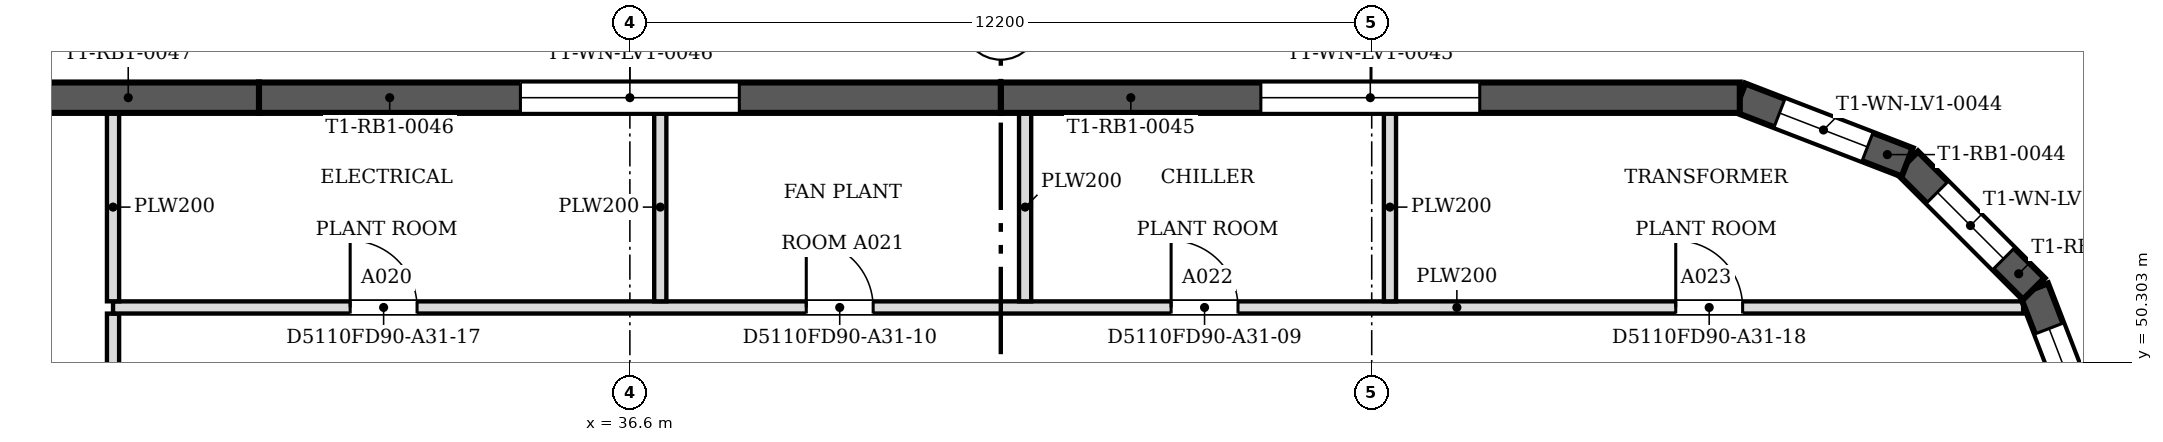
"""IFC4 building model, lengths in metres.
Left out: names, types, materials, properties, quantities, classifications, styles, units other than length and angle.
Written with IfcOpenShell. Run it as: python <this file> out.ifc"""

import sys

from ifc_helpers import new_model, si_unit, direction, frame, frame_2d, origin, place, context, subcontext, project, spatial, polyline, rectangle, outline, extrude, faceted_brep, source, transform, mapped, element, fill, save


model = new_model("IFC4")
c1 = context("Model", 3, precision=1e-05, world=origin(), true_north=direction((0.0, 1.0)))
c2 = subcontext(c1, "Body", "Model", "MODEL_VIEW")
j1 = project(units=[si_unit("LENGTHUNIT", "METRE"), si_unit("PLANEANGLEUNIT", "RADIAN")], contexts=[c1])
p1 = place(None, origin())
s1 = spatial("IfcSite", under=j1, at=p1, CompositionType="ELEMENT")
p2 = place(p1, origin())
s2 = spatial("IfcBuilding", under=s1, at=p2, CompositionType="ELEMENT")
p3 = place(p2, frame((0.0, 0.0, 150.6)))
s3 = spatial("IfcBuildingStorey", under=s2, at=p3, CompositionType="ELEMENT", Elevation=150.6)
m1 = source(origin(), c2, "Body", "Brep", [
    faceted_brep([(0.0, -0.25, 0.0), (2.95, -0.25, 0.0), (2.95, -0.25, 4.8), (0.0, -0.25, 4.8), (0.047, 0.25, 4.8), (2.898, 0.25, 4.8), (2.898, 0.25, 0.0), (0.047, 0.25, 0.0), (2.95, 0.0, 0.0), (0.0, 0.0, 0.0), (2.95, 0.0, 4.8), (0.0, 0.0, 4.8)], [[[0, 1, 2, 3]], [[4, 5, 6, 7]], [[7, 6, 8, 1, 0, 9]], [[10, 2, 1, 8]], [[5, 4, 11, 3, 2, 10]], [[9, 0, 3, 11]], [[7, 9, 11, 4]], [[8, 6, 5, 10]]]),
])
p4 = place(p3, frame((60.75, 48.753, 0.0), z_axis=(0.0, 0.0, 1.0), x_axis=(-0.359877213415, 0.932999673775, 0.0)))
e1 = element("IfcWall", 1, at=p4, inside=s3, PredefinedType="SOLIDWALL", context=c2, shape_type="MappedRepresentation", body=[
    mapped(m1, transform((0.0, 0.0, 0.0), scale=1.0)),
])
m2 = source(origin(), c2, "Body", "SweptSolid", [
    extrude(outline(polyline([(0.7, 0.8), (2.25, 0.8), (2.25, 4.0), (0.7, 4.0), (0.7, 0.8)])), frame((0.0, 0.26, 0.0), z_axis=(0.0, -1.0, 0.0), x_axis=(1.0, 0.0, 0.0)), (0.0, 0.0, 1.0), 0.52),
])
p5 = place(p4, origin())
e2 = element("IfcOpeningElement", 2, at=p5, cuts=e1, PredefinedType="OPENING", context=c2, shape_type="MappedRepresentation", body=[
    mapped(m2, transform((0.0, 0.0, 0.0), scale=1.0)),
])
m3 = source(origin(), c2, "Body", "Brep", [
    faceted_brep([(0.0, -0.25, 0.0), (2.944, -0.25, 0.0), (2.944, -0.25, 4.8), (0.0, -0.25, 4.8), (0.053, 0.25, 4.8), (2.891, 0.25, 4.8), (2.891, 0.25, 0.0), (0.053, 0.25, 0.0), (2.944, 0.0, 0.0), (0.0, 0.0, 0.0), (2.944, 0.0, 4.8), (0.0, 0.0, 4.8)], [[[0, 1, 2, 3]], [[4, 5, 6, 7]], [[7, 6, 8, 1, 0, 9]], [[10, 2, 1, 8]], [[5, 4, 11, 3, 2, 10]], [[9, 0, 3, 11]], [[7, 9, 11, 4]], [[8, 6, 5, 10]]]),
])
p6 = place(p3, frame((59.688, 51.506, 0.0), z_axis=(0.0, 0.0, 1.0), x_axis=(-0.707106781187, 0.707106781187, 0.0)))
e3 = element("IfcWall", 3, at=p6, inside=s3, PredefinedType="SOLIDWALL", context=c2, shape_type="MappedRepresentation", body=[
    mapped(m3, transform((0.0, 0.0, 0.0), scale=1.0)),
])
m4 = source(origin(), c2, "Body", "SweptSolid", [
    extrude(outline(polyline([(0.7, 0.8), (2.244, 0.8), (2.244, 4.0), (0.7, 4.0), (0.7, 0.8)])), frame((0.0, 0.26, 0.0), z_axis=(0.0, -1.0, 0.0), x_axis=(1.0, 0.0, 0.0)), (0.0, 0.0, 1.0), 0.52),
])
p7 = place(p6, origin())
e4 = element("IfcOpeningElement", 4, at=p7, cuts=e3, PredefinedType="OPENING", context=c2, shape_type="MappedRepresentation", body=[
    mapped(m4, transform((0.0, 0.0, 0.0), scale=1.0)),
])
m5 = source(origin(), c2, "Body", "Brep", [
    faceted_brep([(0.0, -0.25, 0.0), (2.95, -0.25, 0.0), (2.95, -0.25, 4.8), (0.0, -0.25, 4.8), (0.053, 0.25, 4.8), (2.904, 0.25, 4.8), (2.904, 0.25, 0.0), (0.053, 0.25, 0.0), (2.95, 0.0, 0.0), (0.0, 0.0, 0.0), (2.95, 0.0, 4.8), (0.0, 0.0, 4.8)], [[[0, 1, 2, 3]], [[4, 5, 6, 7]], [[7, 6, 8, 1, 0, 9]], [[10, 2, 1, 8]], [[5, 4, 11, 3, 2, 10]], [[9, 0, 3, 11]], [[7, 9, 11, 4]], [[8, 6, 5, 10]]]),
])
p8 = place(p3, frame((57.606, 53.588, 0.0), z_axis=(0.0, 0.0, 1.0), x_axis=(-0.932999673775, 0.359877213415, 0.0)))
e5 = element("IfcWall", 5, at=p8, inside=s3, PredefinedType="SOLIDWALL", context=c2, shape_type="MappedRepresentation", body=[
    mapped(m5, transform((0.0, 0.0, 0.0), scale=1.0)),
])
p9 = place(p8, origin())
e6 = element("IfcOpeningElement", 6, at=p9, cuts=e5, PredefinedType="OPENING", context=c2, shape_type="MappedRepresentation", body=[
    mapped(m2, transform((0.0, 0.0, 0.0), scale=1.0)),
])
m6 = source(origin(), c2, "Body", "Brep", [
    faceted_brep([(0.0, -0.25, 0.0), (12.154, -0.25, 0.0), (12.154, -0.25, 4.8), (0.0, -0.25, 4.8), (0.047, 0.25, 4.8), (12.154, 0.25, 4.8), (12.154, 0.25, 0.0), (0.047, 0.25, 0.0), (0.0, 0.0, 0.0), (0.0, 0.0, 4.8)], [[[0, 1, 2, 3]], [[4, 5, 6, 7]], [[7, 6, 1, 0, 8]], [[5, 4, 9, 3, 2]], [[8, 0, 3, 9]], [[7, 8, 9, 4]], [[1, 6, 5, 2]]]),
])
p10 = place(p3, frame((54.854, 54.65, 0.0), z_axis=(0.0, 0.0, 1.0), x_axis=(-1.0, 0.0, 0.0)))
e7 = element("IfcWall", 7, at=p10, inside=s3, PredefinedType="SOLIDWALL", context=c2, shape_type="MappedRepresentation", body=[
    mapped(m6, transform((0.0, 0.0, 0.0), scale=1.0)),
])
m7 = source(origin(), c2, "Body", "SweptSolid", [
    extrude(outline(polyline([(4.277, 0.8), (7.877, 0.8), (7.877, 4.0), (4.277, 4.0), (4.277, 0.8)])), frame((0.0, 0.26, 0.0), z_axis=(0.0, -1.0, 0.0), x_axis=(1.0, 0.0, 0.0)), (0.0, 0.0, 1.0), 0.52),
])
p11 = place(p10, origin())
e8 = element("IfcOpeningElement", 8, at=p11, cuts=e7, PredefinedType="OPENING", context=c2, shape_type="MappedRepresentation", body=[
    mapped(m7, transform((0.0, 0.0, 0.0), scale=1.0)),
])
m8 = source(origin(), c2, "Body", "SweptSolid", [
    extrude(outline(polyline([(0.0, 0.0), (12.2, 0.0), (12.2, 4.8), (0.0, 4.8), (0.0, 0.0)])), frame((0.0, 0.25, 0.0), z_axis=(0.0, -1.0, 0.0), x_axis=(1.0, 0.0, 0.0)), (0.0, 0.0, 1.0), 0.5),
])
p12 = place(p3, frame((42.7, 54.65, 0.0), z_axis=(0.0, 0.0, 1.0), x_axis=(-1.0, 0.0, 0.0)))
e9 = element("IfcWall", 9, at=p12, inside=s3, PredefinedType="SOLIDWALL", context=c2, shape_type="MappedRepresentation", body=[
    mapped(m8, transform((0.0, 0.0, 0.0), scale=1.0)),
])
m9 = source(origin(), c2, "Body", "SweptSolid", [
    extrude(outline(polyline([(4.3, 0.8), (7.9, 0.8), (7.9, 4.0), (4.3, 4.0), (4.3, 0.8)])), frame((0.0, 0.26, 0.0), z_axis=(0.0, -1.0, 0.0), x_axis=(1.0, 0.0, 0.0)), (0.0, 0.0, 1.0), 0.52),
])
p13 = place(p12, origin())
e10 = element("IfcOpeningElement", 10, at=p13, cuts=e9, PredefinedType="OPENING", context=c2, shape_type="MappedRepresentation", body=[
    mapped(m9, transform((0.0, 0.0, 0.0), scale=1.0)),
])
p14 = place(p3, frame((30.5, 54.65, 0.0), z_axis=(0.0, 0.0, 1.0), x_axis=(-1.0, 0.0, 0.0)))
e11 = element("IfcWall", 11, at=p14, inside=s3, PredefinedType="SOLIDWALL", context=c2, shape_type="MappedRepresentation", body=[
    mapped(m8, transform((0.0, 0.0, 0.0), scale=1.0)),
])
p15 = place(p14, origin())
e12 = element("IfcOpeningElement", 12, at=p15, cuts=e11, PredefinedType="OPENING", context=c2, shape_type="MappedRepresentation", body=[
    mapped(m9, transform((0.0, 0.0, 0.0), scale=1.0)),
])
p16 = place(p3, frame((28.1, 48.101, 0.0), z_axis=(0.0, 0.0, 1.0), x_axis=(0.0, 1.0, 0.0)))
e13 = element("IfcWall", 13, at=p16, inside=s3, PredefinedType="PARTITIONING", context=c2, shape_type="SweptSolid", body=[
    extrude(rectangle(XDim=2.998, YDim=0.2, at=frame_2d((1.499, 0.0))), origin(), (0.0, 0.0, 1.0), 4.067),
])
p17 = place(p3, frame((28.1, 51.2, 0.0), z_axis=(0.0, 0.0, 1.0), x_axis=(1.0, 0.0, 0.0)))
e14 = element("IfcWall", 14, at=p17, inside=s3, PredefinedType="PARTITIONING", context=c2, shape_type="SweptSolid", body=[
    extrude(rectangle(XDim=31.413, YDim=0.2, at=frame_2d((15.707, 0.0))), origin(), (0.0, 0.0, 1.0), 4.067),
])
m10 = source(origin(), c2, "Body", "SweptSolid", [
    extrude(rectangle(XDim=1.1, YDim=2.1, at=frame_2d((0.55, 1.05))), frame((0.0, 0.11, 0.0), z_axis=(0.0, -1.0, 0.0), x_axis=(1.0, 0.0, 0.0)), (0.0, 0.0, 1.0), 0.22),
])
p18 = place(p17, frame((17.401, 0.0, 0.0)))
e15 = element("IfcOpeningElement", 15, at=p18, cuts=e14, PredefinedType="OPENING", context=c2, shape_type="MappedRepresentation", body=[
    mapped(m10, transform((0.0, 0.0, 0.0), scale=1.0)),
])
p19 = place(p17, frame((11.401, 0.0, 0.0)))
e16 = element("IfcOpeningElement", 16, at=p19, cuts=e14, PredefinedType="OPENING", context=c2, shape_type="MappedRepresentation", body=[
    mapped(m10, transform((0.0, 0.0, 0.0), scale=1.0)),
])
p20 = place(p17, frame((3.9, 0.0, 0.0)))
e17 = element("IfcOpeningElement", 17, at=p20, cuts=e14, PredefinedType="OPENING", context=c2, shape_type="MappedRepresentation", body=[
    mapped(m10, transform((0.0, 0.0, 0.0), scale=1.0)),
])
p21 = place(p17, frame((25.7, 0.0, 0.0)))
e18 = element("IfcOpeningElement", 18, at=p21, cuts=e14, PredefinedType="OPENING", context=c2, shape_type="MappedRepresentation", body=[
    mapped(m10, transform((0.0, 0.0, 0.0), scale=1.0)),
])
for number, where, z_axis, x_axis in (
    (19, (28.1, 51.301, 0.0), (0.0, 0.0, 1.0), (0.0, 1.0, 0.0)),
    (20, (37.1, 51.301, 0.0), (0.0, 0.0, 1.0), (0.0, 1.0, 0.0)),
    (21, (43.1, 51.301, 0.0), (0.0, 0.0, 1.0), (0.0, 1.0, 0.0)),
    (22, (49.1, 51.301, 0.0), (0.0, 0.0, 1.0), (0.0, 1.0, 0.0)),
):
    element("IfcWall", number, at=place(p3, frame(where, z_axis=z_axis, x_axis=x_axis)), inside=s3, PredefinedType="PARTITIONING", context=c2, shape_type="SweptSolid", body=[
        extrude(rectangle(XDim=3.099, YDim=0.2, at=frame_2d((1.549, 0.0))), origin(), (0.0, 0.0, 1.0), 4.067),
    ])
m11 = source(origin(), c2, "Body", "SweptSolid", [
    extrude(outline(polyline([(0.7, 0.8), (2.25, 0.8), (2.25, 4.0), (0.7, 4.0), (0.7, 0.8)])), frame((0.0, 0.03, 0.0), z_axis=(0.0, -1.0, 0.0), x_axis=(1.0, 0.0, 0.0)), (0.0, 0.0, 1.0), 0.06),
])
p22 = place(p5, origin())
e23 = element("IfcWindow", 23, at=p22, inside=s3, PartitioningType="USERDEFINED", PredefinedType="WINDOW", context=c2, shape_type="MappedRepresentation", body=[
    mapped(m11, transform((0.0, 0.0, 0.0), scale=1.0)),
])
fill(e2, e23)
m12 = source(origin(), c2, "Body", "SweptSolid", [
    extrude(outline(polyline([(0.7, 0.8), (2.244, 0.8), (2.244, 4.0), (0.7, 4.0), (0.7, 0.8)])), frame((0.0, 0.03, 0.0), z_axis=(0.0, -1.0, 0.0), x_axis=(1.0, 0.0, 0.0)), (0.0, 0.0, 1.0), 0.06),
])
p23 = place(p7, origin())
e24 = element("IfcWindow", 24, at=p23, inside=s3, PartitioningType="USERDEFINED", PredefinedType="WINDOW", context=c2, shape_type="MappedRepresentation", body=[
    mapped(m12, transform((0.0, 0.0, 0.0), scale=1.0)),
])
fill(e4, e24)
p24 = place(p9, origin())
e25 = element("IfcWindow", 25, at=p24, inside=s3, PartitioningType="USERDEFINED", PredefinedType="WINDOW", context=c2, shape_type="MappedRepresentation", body=[
    mapped(m11, transform((0.0, 0.0, 0.0), scale=1.0)),
])
fill(e6, e25)
m13 = source(origin(), c2, "Body", "SweptSolid", [
    extrude(outline(polyline([(4.277, 0.8), (7.877, 0.8), (7.877, 4.0), (4.277, 4.0), (4.277, 0.8)])), frame((0.0, 0.03, 0.0), z_axis=(0.0, -1.0, 0.0), x_axis=(1.0, 0.0, 0.0)), (0.0, 0.0, 1.0), 0.06),
])
p25 = place(p11, origin())
e26 = element("IfcWindow", 26, at=p25, inside=s3, PartitioningType="USERDEFINED", PredefinedType="WINDOW", context=c2, shape_type="MappedRepresentation", body=[
    mapped(m13, transform((0.0, 0.0, 0.0), scale=1.0)),
])
fill(e8, e26)
m14 = source(origin(), c2, "Body", "SweptSolid", [
    extrude(outline(polyline([(4.3, 0.8), (7.9, 0.8), (7.9, 4.0), (4.3, 4.0), (4.3, 0.8)])), frame((0.0, 0.03, 0.0), z_axis=(0.0, -1.0, 0.0), x_axis=(1.0, 0.0, 0.0)), (0.0, 0.0, 1.0), 0.06),
])
p26 = place(p13, origin())
e27 = element("IfcWindow", 27, at=p26, inside=s3, PartitioningType="USERDEFINED", PredefinedType="WINDOW", context=c2, shape_type="MappedRepresentation", body=[
    mapped(m14, transform((0.0, 0.0, 0.0), scale=1.0)),
])
fill(e10, e27)
m15 = source(origin(), c2, "Body", "SweptSolid", [
    extrude(rectangle(XDim=1.1, YDim=2.1, at=frame_2d((0.55, 1.05))), frame((0.0, 0.025, 0.0), z_axis=(0.0, -1.0, 0.0), x_axis=(1.0, 0.0, 0.0)), (0.0, 0.0, 1.0), 0.05),
])
p27 = place(p18, origin())
e28 = element("IfcDoor", 28, at=p27, inside=s3, OperationType="SINGLE_SWING_LEFT", PredefinedType="DOOR", context=c2, shape_type="MappedRepresentation", body=[
    mapped(m15, transform((0.0, 0.0, 0.0), scale=1.0)),
])
fill(e15, e28)
p28 = place(p19, origin())
e29 = element("IfcDoor", 29, at=p28, inside=s3, OperationType="SINGLE_SWING_LEFT", PredefinedType="DOOR", context=c2, shape_type="MappedRepresentation", body=[
    mapped(m15, transform((0.0, 0.0, 0.0), scale=1.0)),
])
fill(e16, e29)
p29 = place(p20, origin())
e30 = element("IfcDoor", 30, at=p29, inside=s3, OperationType="SINGLE_SWING_LEFT", PredefinedType="DOOR", context=c2, shape_type="MappedRepresentation", body=[
    mapped(m15, transform((0.0, 0.0, 0.0), scale=1.0)),
])
fill(e17, e30)
p30 = place(p21, origin())
e31 = element("IfcDoor", 31, at=p30, inside=s3, OperationType="SINGLE_SWING_LEFT", PredefinedType="DOOR", context=c2, shape_type="MappedRepresentation", body=[
    mapped(m15, transform((0.0, 0.0, 0.0), scale=1.0)),
])
fill(e18, e31)
save(model, sys.argv[1])
